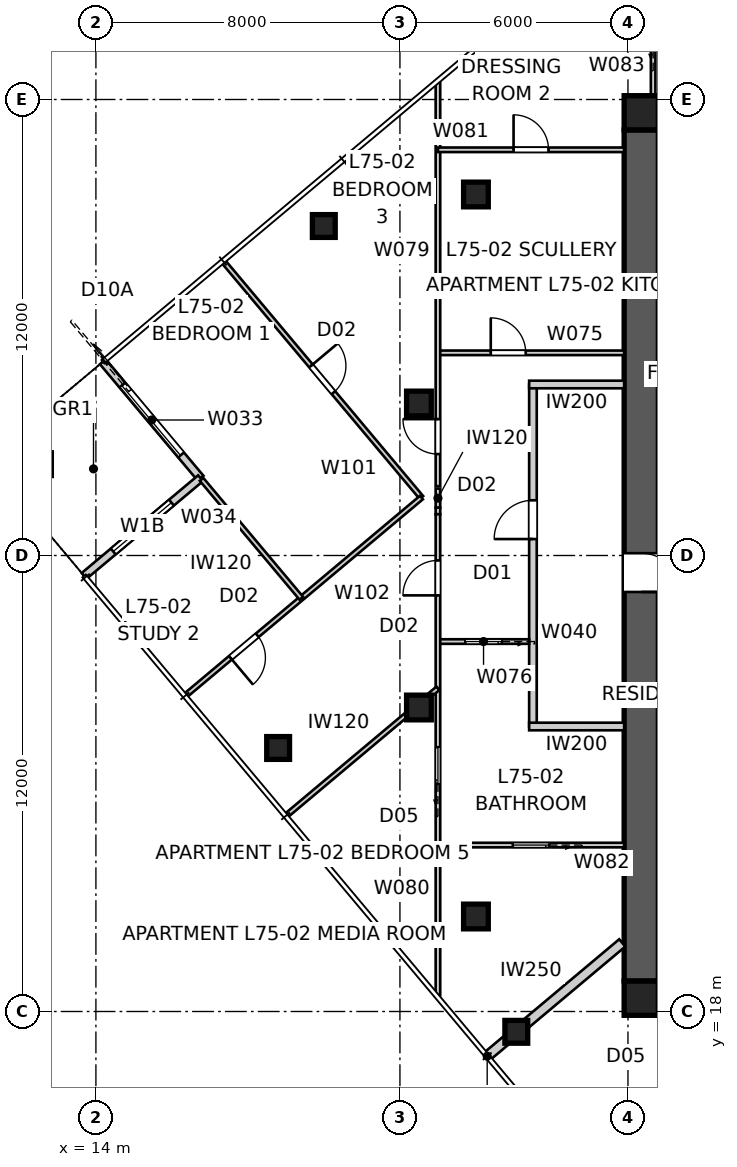
"""IFC4 building model, lengths in metres.
Left out: names, types, materials, properties, quantities, classifications, styles, units other than length and angle.
Written with IfcOpenShell. Run it as: python <this file> out.ifc"""

import sys

from ifc_helpers import new_model, si_unit, direction, frame, frame_2d, origin, origin_2d, place, context, subcontext, project, spatial, polyline, rectangle, outline, extrude, element, fill, save


model = new_model("IFC4")
c1 = context("Model", 3, precision=1e-05, world=origin(), true_north=direction((0.0, 1.0)))
c2 = subcontext(c1, "Body", "Model", "MODEL_VIEW")
j1 = project(units=[si_unit("LENGTHUNIT", "METRE"), si_unit("PLANEANGLEUNIT", "RADIAN")], contexts=[c1])
p1 = place(None, origin())
s1 = spatial("IfcSite", under=j1, at=p1, CompositionType="ELEMENT")
p2 = place(p1, origin())
s2 = spatial("IfcBuilding", under=s1, at=p2, CompositionType="ELEMENT")
p3 = place(p2, frame((0.0, 0.0, 272.6)))
s3 = spatial("IfcBuildingStorey", under=s2, at=p3, CompositionType="ELEMENT", Elevation=272.6)
for number, where, z_axis, x_axis in (
    (1, (28.8, 41.65, 0.0), (0.0, 0.0, 1.0), (1.0, 0.0, 0.0)),
    (2, (51.2, 18.35, 0.0), (0.0, 0.0, 1.0), (-1.0, 0.0, 0.0)),
):
    element("IfcWall", number, at=place(p3, frame(where, z_axis=z_axis, x_axis=x_axis)), inside=s3, PredefinedType="SHEAR", context=c2, shape_type="SweptSolid", body=[
        extrude(outline(polyline([(0.0, -0.45), (22.4, -0.45), (22.4, -0.025), (22.85, -0.025), (22.85, 0.025), (22.4, 0.025), (22.4, 0.45), (0.0, 0.45), (0.0, 0.025), (-0.45, 0.025), (-0.45, -0.025), (0.0, -0.025), (0.0, -0.45)])), origin(), (0.0, 0.0, 1.0), 3.4),
    ])
p4 = place(p3, frame((28.35, 41.2, 0.0), z_axis=(0.0, 0.0, 1.0), x_axis=(0.0, -1.0, 0.0)))
e3 = element("IfcWall", 3, at=p4, inside=s3, PredefinedType="SHEAR", context=c2, shape_type="SweptSolid", body=[
    extrude(outline(polyline([(0.0, -0.45), (22.4, -0.45), (22.4, -0.025), (22.85, -0.025), (22.85, 0.025), (22.4, 0.025), (22.4, 0.45), (0.0, 0.45), (0.0, 0.025), (-0.45, 0.025), (-0.45, -0.025), (0.0, -0.025), (0.0, -0.45)])), origin(), (0.0, 0.0, 1.0), 3.4),
])
p5 = place(p4, frame((11.14, 0.0, 0.0)))
e4 = element("IfcOpeningElement", 4, at=p5, cuts=e3, PredefinedType="OPENING", context=c2, shape_type="SweptSolid", body=[
    extrude(rectangle(XDim=1.02, YDim=2.4, at=frame_2d((0.51, 1.2))), frame((0.0, 0.46, 0.0), z_axis=(0.0, -1.0, 0.0), x_axis=(1.0, 0.0, 0.0)), (0.0, 0.0, 1.0), 0.92),
])
for number, where, z_axis, x_axis in (
    (5, (28.35, 18.35, 0.0), (0.0, 0.0, 1.0), (1.0, 0.0, 0.0)),
    (6, (28.35, 41.65, 0.0), (0.0, 0.0, 1.0), (1.0, 0.0, 0.0)),
):
    element("IfcColumn", number, at=place(p3, frame(where, z_axis=z_axis, x_axis=x_axis)), inside=s3, PredefinedType="COLUMN", context=c2, shape_type="SweptSolid", body=[
        extrude(rectangle(XDim=0.9, YDim=0.9, at=origin_2d()), origin(), (0.0, 0.0, 1.0), 3.4),
    ])
for number, where, z_axis, x_axis in (
    (7, (19.997, 38.671, -0.15), (0.0, 0.0, 1.0), (1.0, 0.0, 0.0)),
    (8, (18.795, 24.935, -0.15), (0.0, 0.0, 1.0), (1.0, 0.0, 0.0)),
    (9, (25.062, 17.466, -0.15), (0.0, 0.0, 1.0), (1.0, 0.0, 0.0)),
):
    element("IfcColumn", number, at=place(p3, frame(where, z_axis=z_axis, x_axis=x_axis)), inside=s3, PredefinedType="COLUMN", context=c2, shape_type="SweptSolid", body=[
        extrude(rectangle(XDim=0.6, YDim=0.6, at=origin_2d()), origin(), (0.0, 0.0, 1.0), 3.55),
    ])
for number, where, z_axis, x_axis in (
    (10, (24.0, 39.5, 0.0), (0.0, 0.0, 1.0), (1.0, 0.0, 0.0)),
    (11, (22.5, 34.0, 0.0), (0.0, 0.0, 1.0), (1.0, 0.0, 0.0)),
    (12, (22.5, 26.0, 0.0), (0.0, 0.0, 1.0), (1.0, 0.0, 0.0)),
    (13, (24.0, 20.5, 0.0), (0.0, 0.0, 1.0), (1.0, 0.0, 0.0)),
):
    element("IfcColumn", number, at=place(p3, frame(where, z_axis=z_axis, x_axis=x_axis)), inside=s3, PredefinedType="COLUMN", context=c2, shape_type="SweptSolid", body=[
        extrude(rectangle(XDim=0.65, YDim=0.65, at=origin_2d()), origin(), (0.0, 0.0, 1.0), 3.4),
    ])
p6 = place(p3, frame((14.183, 35.098, 0.0), z_axis=(0.0, 0.0, 1.0), x_axis=(0.642768287094, -0.766060656284, 0.0)))
e14 = element("IfcWall", 14, at=p6, inside=s3, PredefinedType="SOLIDWALL", context=c2, shape_type="SweptSolid", body=[
    extrude(rectangle(XDim=4.0, YDim=0.2, at=frame_2d((2.0, 0.0))), origin(), (0.0, 0.0, 1.0), 3.25),
])
p7 = place(p6, frame((0.8, 0.0, 0.0)))
e15 = element("IfcOpeningElement", 15, at=p7, cuts=e14, PredefinedType="OPENING", context=c2, shape_type="SweptSolid", body=[
    extrude(rectangle(XDim=2.4, YDim=2.1, at=frame_2d((1.2, 1.05))), frame((0.0, 0.11, 0.0), z_axis=(0.0, -1.0, 0.0), x_axis=(1.0, 0.0, 0.0)), (0.0, 0.0, 1.0), 0.22),
])
p8 = place(p3, frame((16.754, 32.034, 0.0), z_axis=(0.0, 0.0, 1.0), x_axis=(-0.766035437498, -0.642798342015, 0.0)))
e16 = element("IfcWall", 16, at=p8, inside=s3, PredefinedType="SOLIDWALL", context=c2, shape_type="SweptSolid", body=[
    extrude(rectangle(XDim=4.0, YDim=0.2, at=frame_2d((2.0, 0.0))), origin(), (0.0, 0.0, 1.0), 3.25),
])
p9 = place(p8, frame((1.0, 0.0, 0.45)))
e17 = element("IfcOpeningElement", 17, at=p9, cuts=e16, PredefinedType="OPENING", context=c2, shape_type="SweptSolid", body=[
    extrude(rectangle(XDim=2.0, YDim=1.8, at=frame_2d((1.0, 0.9))), frame((0.0, 0.11, 0.0), z_axis=(0.0, -1.0, 0.0), x_axis=(1.0, 0.0, 0.0)), (0.0, 0.0, 1.0), 0.22),
])
p10 = place(p3, frame((25.5, 25.5, 0.0), z_axis=(0.0, 0.0, 1.0), x_axis=(0.0, 1.0, 0.0)))
e18 = element("IfcWall", 18, at=p10, inside=s3, PredefinedType="PARTITIONING", context=c2, shape_type="SweptSolid", body=[
    extrude(rectangle(XDim=9.0, YDim=0.2, at=frame_2d((4.5, 0.0))), origin(), (0.0, 0.0, 1.0), 3.25),
])
p11 = place(p10, frame((4.933, 0.0, 0.0)))
e19 = element("IfcOpeningElement", 19, at=p11, cuts=e18, PredefinedType="OPENING", context=c2, shape_type="SweptSolid", body=[
    extrude(rectangle(XDim=1.02, YDim=2.34, at=frame_2d((0.51, 1.17))), frame((0.0, 0.11, 0.0), z_axis=(0.0, -1.0, 0.0), x_axis=(1.0, 0.0, 0.0)), (0.0, 0.0, 1.0), 0.22),
])
for number, where, z_axis, x_axis in (
    (20, (27.9, 34.5, 0.0), (0.0, 0.0, 1.0), (-1.0, 0.0, 0.0)),
    (21, (27.9, 25.5, 0.0), (0.0, 0.0, 1.0), (-1.0, 0.0, 0.0)),
):
    element("IfcWall", number, at=place(p3, frame(where, z_axis=z_axis, x_axis=x_axis)), inside=s3, PredefinedType="PARTITIONING", context=c2, shape_type="SweptSolid", body=[
        extrude(rectangle(XDim=2.5, YDim=0.2, at=frame_2d((1.25, 0.0))), origin(), (0.0, 0.0, 1.0), 3.25),
    ])
p12 = place(p3, frame((24.296, 16.823, 0.0), z_axis=(0.0, 0.0, 1.0), x_axis=(0.76603440109, 0.64279957712, 0.0)))
e22 = element("IfcWall", 22, at=p12, inside=s3, PredefinedType="PARTITIONING", context=c2, shape_type="SweptSolid", body=[
    extrude(rectangle(XDim=4.64, YDim=0.25, at=frame_2d((2.32, 0.0))), origin(), (0.0, 0.0, 1.0), 3.25),
])
p13 = place(p3, frame((23.0, 35.333, 0.0), z_axis=(0.0, 0.0, 1.0), x_axis=(1.0, 0.0, 0.0)))
e23 = element("IfcWall", 23, at=p13, inside=s3, PredefinedType="PARTITIONING", context=c2, shape_type="SweptSolid", body=[
    extrude(rectangle(XDim=4.9, YDim=0.12, at=frame_2d((2.45, 0.0))), origin(), (0.0, 0.0, 1.0), 3.25),
])
p14 = place(p13, frame((1.39, 0.0, 0.0)))
e24 = element("IfcOpeningElement", 24, at=p14, cuts=e23, PredefinedType="OPENING", context=c2, shape_type="SweptSolid", body=[
    extrude(rectangle(XDim=0.92, YDim=2.34, at=frame_2d((0.46, 1.17))), frame((0.0, 0.07, 0.0), z_axis=(0.0, -1.0, 0.0), x_axis=(1.0, 0.0, 0.0)), (0.0, 0.0, 1.0), 0.14),
])
p15 = place(p3, frame((25.4, 27.736, 0.0), z_axis=(0.0, 0.0, 1.0), x_axis=(-1.0, 0.0, 0.0)))
e25 = element("IfcWall", 25, at=p15, inside=s3, PredefinedType="PARTITIONING", context=c2, shape_type="SweptSolid", body=[
    extrude(rectangle(XDim=2.4, YDim=0.12, at=frame_2d((1.2, 0.0))), origin(), (0.0, 0.0, 1.0), 3.25),
])
p16 = place(p15, frame((0.72, 0.0, 0.0)))
e26 = element("IfcOpeningElement", 26, at=p16, cuts=e25, PredefinedType="OPENING", context=c2, shape_type="SweptSolid", body=[
    extrude(rectangle(XDim=0.96, YDim=2.1, at=frame_2d((0.48, 1.05))), frame((0.0, 0.07, 0.0), z_axis=(0.0, -1.0, 0.0), x_axis=(1.0, 0.0, 0.0)), (0.0, 0.0, 1.0), 0.14),
])
p17 = place(p3, frame((23.0, 31.258, 0.0), z_axis=(0.0, 0.0, 1.0), x_axis=(0.0, 1.0, 0.0)))
e27 = element("IfcWall", 27, at=p17, inside=s3, PredefinedType="PARTITIONING", context=c2, shape_type="SweptSolid", body=[
    extrude(rectangle(XDim=0.504, YDim=0.12, at=frame_2d((0.252, 0.0))), origin(), (0.0, 0.0, 1.0), 3.25),
])
p18 = place(p3, frame((23.0, 31.824, 0.0), z_axis=(0.0, 0.0, 1.0), x_axis=(0.0, 1.0, 0.0)))
e28 = element("IfcWall", 28, at=p18, inside=s3, PredefinedType="PARTITIONING", context=c2, shape_type="SweptSolid", body=[
    extrude(rectangle(XDim=10.619, YDim=0.12, at=frame_2d((5.31, 0.0))), origin(), (0.0, 0.0, 1.0), 2.55),
])
p19 = place(p18, frame((0.844, 0.0, 0.0)))
e29 = element("IfcOpeningElement", 29, at=p19, cuts=e28, PredefinedType="OPENING", context=c2, shape_type="SweptSolid", body=[
    extrude(rectangle(XDim=0.92, YDim=2.34, at=frame_2d((0.46, 1.17))), frame((0.0, 0.07, 0.0), z_axis=(0.0, -1.0, 0.0), x_axis=(1.0, 0.0, 0.0)), (0.0, 0.0, 1.0), 0.14),
])
p20 = place(p3, frame((23.0, 18.43, 0.0), z_axis=(0.0, 0.0, 1.0), x_axis=(0.0, 1.0, 0.0)))
e30 = element("IfcWall", 30, at=p20, inside=s3, PredefinedType="PARTITIONING", context=c2, shape_type="SweptSolid", body=[
    extrude(rectangle(XDim=12.656, YDim=0.12, at=frame_2d((6.328, 0.0))), origin(), (0.0, 0.0, 1.0), 2.55),
])
p21 = place(p20, frame((10.521, 0.0, 0.0)))
e31 = element("IfcOpeningElement", 31, at=p21, cuts=e30, PredefinedType="OPENING", context=c2, shape_type="SweptSolid", body=[
    extrude(rectangle(XDim=0.92, YDim=2.34, at=frame_2d((0.46, 1.17))), frame((0.0, 0.07, 0.0), z_axis=(0.0, -1.0, 0.0), x_axis=(1.0, 0.0, 0.0)), (0.0, 0.0, 1.0), 0.14),
])
p22 = place(p20, frame((5.565, 0.0, 0.0)))
e32 = element("IfcOpeningElement", 32, at=p22, cuts=e30, PredefinedType="OPENING", context=c2, shape_type="SweptSolid", body=[
    extrude(rectangle(XDim=0.96, YDim=2.1, at=frame_2d((0.48, 1.05))), frame((0.0, 0.07, 0.0), z_axis=(0.0, -1.0, 0.0), x_axis=(1.0, 0.0, 0.0)), (0.0, 0.0, 1.0), 0.14),
])
p23 = place(p3, frame((23.0, 40.676, 0.0), z_axis=(0.0, 0.0, 1.0), x_axis=(1.0, 0.0, 0.0)))
e33 = element("IfcWall", 33, at=p23, inside=s3, PredefinedType="PARTITIONING", context=c2, shape_type="SweptSolid", body=[
    extrude(rectangle(XDim=4.9, YDim=0.12, at=frame_2d((2.45, 0.0))), origin(), (0.0, 0.0, 1.0), 3.25),
])
p24 = place(p23, frame((1.99, 0.0, 0.0)))
e34 = element("IfcOpeningElement", 34, at=p24, cuts=e33, PredefinedType="OPENING", context=c2, shape_type="SweptSolid", body=[
    extrude(rectangle(XDim=0.92, YDim=2.1, at=frame_2d((0.46, 1.05))), frame((0.0, 0.07, 0.0), z_axis=(0.0, -1.0, 0.0), x_axis=(1.0, 0.0, 0.0)), (0.0, 0.0, 1.0), 0.14),
])
p25 = place(p3, frame((27.9, 22.38, 0.0), z_axis=(0.0, 0.0, 1.0), x_axis=(-1.0, 0.0, 0.0)))
e35 = element("IfcWall", 35, at=p25, inside=s3, PredefinedType="PARTITIONING", context=c2, shape_type="SweptSolid", body=[
    extrude(rectangle(XDim=4.9, YDim=0.12, at=frame_2d((2.45, 0.0))), origin(), (0.0, 0.0, 1.0), 3.25),
])
p26 = place(p25, frame((1.97, 0.0, 0.0)))
e36 = element("IfcOpeningElement", 36, at=p26, cuts=e35, PredefinedType="OPENING", context=c2, shape_type="SweptSolid", body=[
    extrude(rectangle(XDim=0.96, YDim=2.1, at=frame_2d((0.48, 1.05))), frame((0.0, 0.07, 0.0), z_axis=(0.0, -1.0, 0.0), x_axis=(1.0, 0.0, 0.0)), (0.0, 0.0, 1.0), 0.14),
])
p27 = place(p3, frame((28.663, 41.18, 0.0), z_axis=(0.0, 0.0, 1.0), x_axis=(0.0, 1.0, 0.0)))
e37 = element("IfcWall", 37, at=p27, inside=s3, PredefinedType="PARTITIONING", context=c2, shape_type="SweptSolid", body=[
    extrude(rectangle(XDim=5.82, YDim=0.12, at=frame_2d((2.91, 0.0))), origin(), (0.0, 0.0, 1.0), 3.25),
])
p28 = place(p27, frame((2.44, 0.0, 0.0)))
e38 = element("IfcOpeningElement", 38, at=p28, cuts=e37, PredefinedType="OPENING", context=c2, shape_type="SweptSolid", body=[
    extrude(rectangle(XDim=0.96, YDim=2.1, at=frame_2d((0.48, 1.05))), frame((0.0, 0.07, 0.0), z_axis=(0.0, -1.0, 0.0), x_axis=(1.0, 0.0, 0.0)), (0.0, 0.0, 1.0), 0.14),
])
p29 = place(p3, frame((17.369, 37.719, 0.0), z_axis=(0.0, 0.0, 1.0), x_axis=(0.642800378028, -0.766033729027, 0.0)))
e39 = element("IfcWall", 39, at=p29, inside=s3, PredefinedType="PARTITIONING", context=c2, shape_type="SweptSolid", body=[
    extrude(rectangle(XDim=8.085, YDim=0.12, at=frame_2d((4.042, 0.0))), origin(), (0.0, 0.0, 1.0), 3.25),
])
p30 = place(p29, frame((3.562, 0.0, 0.0)))
e40 = element("IfcOpeningElement", 40, at=p30, cuts=e39, PredefinedType="OPENING", context=c2, shape_type="SweptSolid", body=[
    extrude(rectangle(XDim=0.92, YDim=2.34, at=frame_2d((0.46, 1.17))), frame((0.0, 0.07, 0.0), z_axis=(0.0, -1.0, 0.0), x_axis=(1.0, 0.0, 0.0)), (0.0, 0.0, 1.0), 0.14),
])
p31 = place(p3, frame((22.566, 31.525, 0.0), z_axis=(0.0, 0.0, 1.0), x_axis=(-0.766033729027, -0.642800378028, 0.0)))
e41 = element("IfcWall", 41, at=p31, inside=s3, PredefinedType="PARTITIONING", context=c2, shape_type="SweptSolid", body=[
    extrude(rectangle(XDim=8.085, YDim=0.12, at=frame_2d((4.042, 0.0))), origin(), (0.0, 0.0, 1.0), 3.25),
])
p32 = place(p31, frame((5.64, 0.0, 0.0)))
e42 = element("IfcOpeningElement", 42, at=p32, cuts=e41, PredefinedType="OPENING", context=c2, shape_type="SweptSolid", body=[
    extrude(rectangle(XDim=0.92, YDim=2.34, at=frame_2d((0.46, 1.17))), frame((0.0, 0.07, 0.0), z_axis=(0.0, -1.0, 0.0), x_axis=(1.0, 0.0, 0.0)), (0.0, 0.0, 1.0), 0.14),
])
p33 = place(p3, frame((19.406, 28.874, 0.0), z_axis=(0.0, 0.0, 1.0), x_axis=(-0.642767300664, 0.766061483953, 0.0)))
e43 = element("IfcWall", 43, at=p33, inside=s3, PredefinedType="PARTITIONING", context=c2, shape_type="SweptSolid", body=[
    extrude(rectangle(XDim=4.085, YDim=0.12, at=frame_2d((2.042, 0.0))), origin(), (0.0, 0.0, 1.0), 3.25),
])
p34 = place(p3, frame((23.0, 26.505, 0.0), z_axis=(0.0, 0.0, 1.0), x_axis=(-0.76605407051, -0.642776136034, 0.0)))
e44 = element("IfcWall", 44, at=p34, inside=s3, PredefinedType="PARTITIONING", context=c2, shape_type="SweptSolid", body=[
    extrude(rectangle(XDim=5.191, YDim=0.12, at=frame_2d((2.595, 0.0))), origin(), (0.0, 0.0, 1.0), 3.25),
])
p35 = place(p3, frame((23.0, 31.258, 0.0), z_axis=(0.0, 0.0, 1.0), x_axis=(0.0, -1.0, 0.0)))
e45 = element("IfcWall", 45, at=p35, inside=s3, PredefinedType="PARTITIONING", context=c2, shape_type="SweptSolid", body=[
    extrude(rectangle(XDim=0.172, YDim=0.12, at=frame_2d((0.086, 0.0))), origin(), (0.0, 0.0, 1.0), 3.25),
])
p36 = place(p7, origin())
e46 = element("IfcDoor", 46, at=p36, inside=s3, OperationType="SLIDING_TO_LEFT", PredefinedType="DOOR", context=c2, shape_type="SweptSolid", body=[
    extrude(rectangle(XDim=2.4, YDim=2.1, at=frame_2d((1.2, 1.05))), frame((0.0, 0.025, 0.0), z_axis=(0.0, -1.0, 0.0), x_axis=(1.0, 0.0, 0.0)), (0.0, 0.0, 1.0), 0.05),
])
fill(e15, e46)
p37 = place(p9, origin())
e47 = element("IfcWindow", 47, at=p37, inside=s3, PartitioningType="SINGLE_PANEL", PredefinedType="WINDOW", context=c2, shape_type="SweptSolid", body=[
    extrude(rectangle(XDim=2.0, YDim=1.8, at=frame_2d((1.0, 0.9))), frame((0.0, 0.03, 0.0), z_axis=(0.0, -1.0, 0.0), x_axis=(1.0, 0.0, 0.0)), (0.0, 0.0, 1.0), 0.06),
])
fill(e17, e47)
p38 = place(p11, origin())
e48 = element("IfcDoor", 48, at=p38, inside=s3, OperationType="SINGLE_SWING_LEFT", PredefinedType="DOOR", context=c2, shape_type="SweptSolid", body=[
    extrude(rectangle(XDim=1.02, YDim=2.34, at=frame_2d((0.51, 1.17))), frame((0.0, 0.025, 0.0), z_axis=(0.0, -1.0, 0.0), x_axis=(1.0, 0.0, 0.0)), (0.0, 0.0, 1.0), 0.05),
])
fill(e19, e48)
p39 = place(p14, origin())
e49 = element("IfcDoor", 49, at=p39, inside=s3, OperationType="SINGLE_SWING_LEFT", PredefinedType="DOOR", context=c2, shape_type="SweptSolid", body=[
    extrude(rectangle(XDim=0.92, YDim=2.34, at=frame_2d((0.46, 1.17))), frame((0.0, 0.025, 0.0), z_axis=(0.0, -1.0, 0.0), x_axis=(1.0, 0.0, 0.0)), (0.0, 0.0, 1.0), 0.05),
])
fill(e24, e49)
p40 = place(p19, origin())
e50 = element("IfcDoor", 50, at=p40, inside=s3, OperationType="SINGLE_SWING_RIGHT", PredefinedType="DOOR", context=c2, shape_type="SweptSolid", body=[
    extrude(rectangle(XDim=0.92, YDim=2.34, at=frame_2d((0.46, 1.17))), frame((0.0, 0.025, 0.0), z_axis=(0.0, -1.0, 0.0), x_axis=(1.0, 0.0, 0.0)), (0.0, 0.0, 1.0), 0.05),
])
fill(e29, e50)
p41 = place(p21, origin())
e51 = element("IfcDoor", 51, at=p41, inside=s3, OperationType="SINGLE_SWING_LEFT", PredefinedType="DOOR", context=c2, shape_type="SweptSolid", body=[
    extrude(rectangle(XDim=0.92, YDim=2.34, at=frame_2d((0.46, 1.17))), frame((0.0, 0.025, 0.0), z_axis=(0.0, -1.0, 0.0), x_axis=(1.0, 0.0, 0.0)), (0.0, 0.0, 1.0), 0.05),
])
fill(e31, e51)
p42 = place(p16, origin())
e52 = element("IfcDoor", 52, at=p42, inside=s3, OperationType="SLIDING_TO_LEFT", PredefinedType="DOOR", context=c2, shape_type="SweptSolid", body=[
    extrude(rectangle(XDim=0.96, YDim=2.1, at=frame_2d((0.48, 1.05))), frame((0.0, 0.025, 0.0), z_axis=(0.0, -1.0, 0.0), x_axis=(1.0, 0.0, 0.0)), (0.0, 0.0, 1.0), 0.05),
])
fill(e26, e52)
p43 = place(p24, origin())
e53 = element("IfcDoor", 53, at=p43, inside=s3, OperationType="SINGLE_SWING_LEFT", PredefinedType="DOOR", context=c2, shape_type="SweptSolid", body=[
    extrude(rectangle(XDim=0.92, YDim=2.1, at=frame_2d((0.46, 1.05))), frame((0.0, 0.025, 0.0), z_axis=(0.0, -1.0, 0.0), x_axis=(1.0, 0.0, 0.0)), (0.0, 0.0, 1.0), 0.05),
])
fill(e34, e53)
p44 = place(p26, origin())
e54 = element("IfcDoor", 54, at=p44, inside=s3, OperationType="SLIDING_TO_LEFT", PredefinedType="DOOR", context=c2, shape_type="SweptSolid", body=[
    extrude(rectangle(XDim=0.96, YDim=2.1, at=frame_2d((0.48, 1.05))), frame((0.0, 0.025, 0.0), z_axis=(0.0, -1.0, 0.0), x_axis=(1.0, 0.0, 0.0)), (0.0, 0.0, 1.0), 0.05),
])
fill(e36, e54)
p45 = place(p22, origin())
e55 = element("IfcDoor", 55, at=p45, inside=s3, OperationType="SLIDING_TO_LEFT", PredefinedType="DOOR", context=c2, shape_type="SweptSolid", body=[
    extrude(rectangle(XDim=0.96, YDim=2.1, at=frame_2d((0.48, 1.05))), frame((0.0, 0.025, 0.0), z_axis=(0.0, -1.0, 0.0), x_axis=(1.0, 0.0, 0.0)), (0.0, 0.0, 1.0), 0.05),
])
fill(e32, e55)
p46 = place(p30, origin())
e56 = element("IfcDoor", 56, at=p46, inside=s3, OperationType="SINGLE_SWING_LEFT", PredefinedType="DOOR", context=c2, shape_type="SweptSolid", body=[
    extrude(rectangle(XDim=0.92, YDim=2.34, at=frame_2d((0.46, 1.17))), frame((0.0, 0.025, 0.0), z_axis=(0.0, -1.0, 0.0), x_axis=(1.0, 0.0, 0.0)), (0.0, 0.0, 1.0), 0.05),
])
fill(e40, e56)
p47 = place(p32, origin())
e57 = element("IfcDoor", 57, at=p47, inside=s3, OperationType="SINGLE_SWING_RIGHT", PredefinedType="DOOR", context=c2, shape_type="SweptSolid", body=[
    extrude(rectangle(XDim=0.92, YDim=2.34, at=frame_2d((0.46, 1.17))), frame((0.0, 0.025, 0.0), z_axis=(0.0, -1.0, 0.0), x_axis=(1.0, 0.0, 0.0)), (0.0, 0.0, 1.0), 0.05),
])
fill(e42, e57)
p48 = place(p5, origin())
e58 = element("IfcDoor", 58, at=p48, inside=s3, OperationType="SINGLE_SWING_RIGHT", PredefinedType="DOOR", context=c2, shape_type="SweptSolid", body=[
    extrude(rectangle(XDim=1.02, YDim=2.4, at=frame_2d((0.51, 1.2))), frame((0.0, 0.025, 0.0), z_axis=(0.0, -1.0, 0.0), x_axis=(1.0, 0.0, 0.0)), (0.0, 0.0, 1.0), 0.05),
])
fill(e4, e58)
save(model, sys.argv[1])
